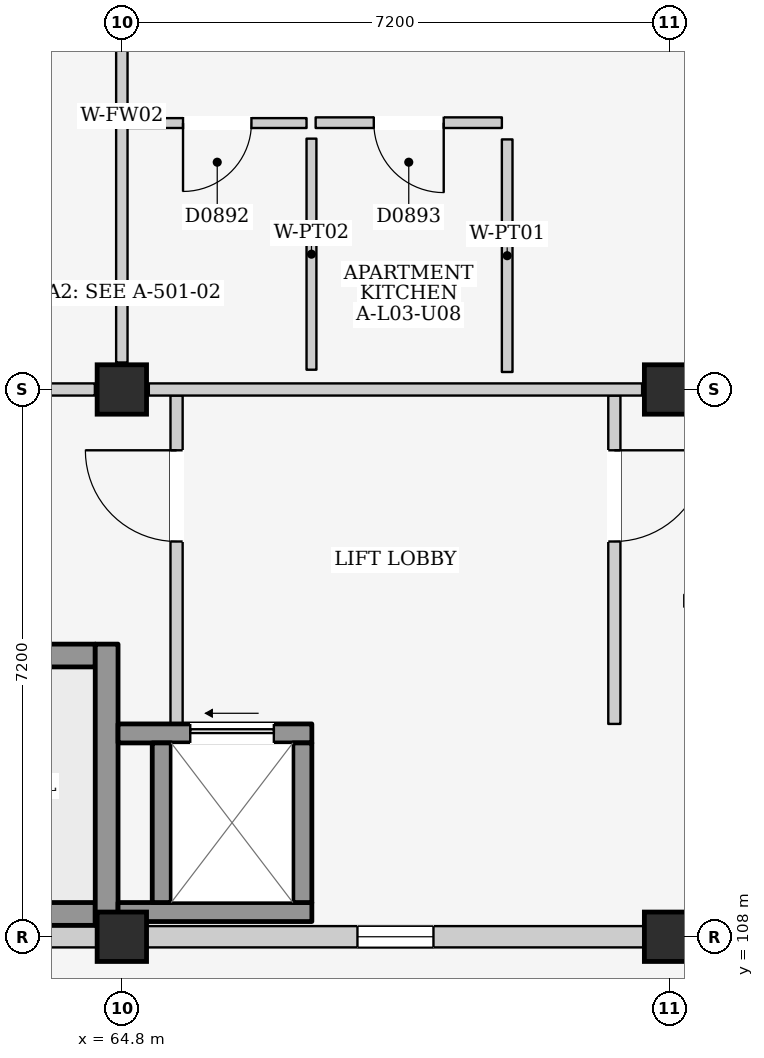
"""IFC4 building model, lengths in metres.
Left out: names, types, materials, properties, quantities, classifications, styles, units other than length and angle.
Written with IfcOpenShell. Run it as: python <this file> out.ifc"""

import sys

from ifc_helpers import new_model, si_unit, direction, frame, frame_2d, origin, origin_2d, place, context, subcontext, project, spatial, rectangle, extrude, element, fill, save


model = new_model("IFC4")
c1 = context("Model", 3, precision=1e-05, world=origin(), true_north=direction((0.0, 1.0)))
c2 = subcontext(c1, "Body", "Model", "MODEL_VIEW")
j1 = project(units=[si_unit("LENGTHUNIT", "METRE"), si_unit("PLANEANGLEUNIT", "RADIAN")], contexts=[c1])
p1 = place(None, origin())
s1 = spatial("IfcSite", under=j1, at=p1, CompositionType="ELEMENT")
p2 = place(p1, origin())
s2 = spatial("IfcBuilding", under=s1, at=p2, CompositionType="ELEMENT")
p3 = place(p2, frame((0.0, 0.0, 12.2)))
s3 = spatial("IfcBuildingStorey", under=s2, at=p3, CompositionType="ELEMENT", Elevation=12.2)
for number, where, z_axis, x_axis in (
    (1, (64.8, 108.0, 0.0), (0.0, 0.0, 1.0), (1.0, 0.0, 0.0)),
    (2, (64.8, 115.2, 0.0), (0.0, 0.0, 1.0), (1.0, 0.0, 0.0)),
    (3, (72.0, 108.0, 0.0), (0.0, 0.0, 1.0), (1.0, 0.0, 0.0)),
    (4, (72.0, 115.2, 0.0), (0.0, 0.0, 1.0), (1.0, 0.0, 0.0)),
):
    element("IfcColumn", number, at=place(p3, frame(where, z_axis=z_axis, x_axis=x_axis)), inside=s3, PredefinedType="COLUMN", context=c2, shape_type="SweptSolid", body=[
        extrude(rectangle(XDim=0.65, YDim=0.65, at=origin_2d()), origin(), (0.0, 0.0, 1.0), 3.2),
    ])
p4 = place(p3, frame((57.925, 108.0, 0.0), z_axis=(0.0, 0.0, 1.0), x_axis=(1.0, 0.0, 0.0)))
e5 = element("IfcWall", 5, at=p4, inside=s3, PredefinedType="ELEMENTEDWALL", context=c2, shape_type="SweptSolid", body=[
    extrude(rectangle(XDim=6.55, YDim=0.28, at=frame_2d((3.275, 0.0))), origin(), (0.0, 0.0, 1.0), 2.315),
])
p5 = place(p4, frame((2.775, 0.0, 1.2)))
e6 = element("IfcOpeningElement", 6, at=p5, cuts=e5, PredefinedType="OPENING", context=c2, shape_type="SweptSolid", body=[
    extrude(rectangle(XDim=1.0, YDim=0.9, at=frame_2d((0.5, 0.45))), frame((0.0, 0.155, 0.0), z_axis=(0.0, -1.0, 0.0), x_axis=(1.0, 0.0, 0.0)), (0.0, 0.0, 1.0), 0.31),
])
p6 = place(p3, frame((65.125, 108.0, 0.0), z_axis=(0.0, 0.0, 1.0), x_axis=(1.0, 0.0, 0.0)))
e7 = element("IfcWall", 7, at=p6, inside=s3, PredefinedType="ELEMENTEDWALL", context=c2, shape_type="SweptSolid", body=[
    extrude(rectangle(XDim=6.55, YDim=0.28, at=frame_2d((3.275, 0.0))), origin(), (0.0, 0.0, 1.0), 2.315),
])
p7 = place(p6, frame((2.775, 0.0, 1.2)))
e8 = element("IfcOpeningElement", 8, at=p7, cuts=e7, PredefinedType="OPENING", context=c2, shape_type="SweptSolid", body=[
    extrude(rectangle(XDim=1.0, YDim=0.9, at=frame_2d((0.5, 0.45))), frame((0.0, 0.155, 0.0), z_axis=(0.0, -1.0, 0.0), x_axis=(1.0, 0.0, 0.0)), (0.0, 0.0, 1.0), 0.31),
])
p8 = place(p3, frame((57.95, 108.3, 0.0), z_axis=(0.0, 0.0, 1.0), x_axis=(1.0, 0.0, 0.0)))
e9 = element("IfcWall", 9, at=p8, inside=s3, PredefinedType="SHEAR", context=c2, shape_type="SweptSolid", body=[
    extrude(rectangle(XDim=6.5, YDim=0.3, at=frame_2d((3.25, 0.0))), origin(), (0.0, 0.0, 1.0), 2.98),
])
p9 = place(p3, frame((57.95, 111.7, 0.0), z_axis=(0.0, 0.0, 1.0), x_axis=(1.0, 0.0, 0.0)))
e10 = element("IfcWall", 10, at=p9, inside=s3, PredefinedType="SHEAR", context=c2, shape_type="SweptSolid", body=[
    extrude(rectangle(XDim=6.5, YDim=0.3, at=frame_2d((3.25, 0.0))), origin(), (0.0, 0.0, 1.0), 2.98),
])
p10 = place(p9, frame((0.18, 0.0, 0.0)))
e11 = element("IfcOpeningElement", 11, at=p10, cuts=e10, PredefinedType="OPENING", context=c2, shape_type="SweptSolid", body=[
    extrude(rectangle(XDim=1.15, YDim=2.2, at=frame_2d((0.575, 1.1))), frame((0.0, 0.165, 0.0), z_axis=(0.0, -1.0, 0.0), x_axis=(1.0, 0.0, 0.0)), (0.0, 0.0, 1.0), 0.33),
])
p11 = place(p3, frame((64.6, 108.15, 0.0), z_axis=(0.0, 0.0, 1.0), x_axis=(0.0, 1.0, 0.0)))
e12 = element("IfcWall", 12, at=p11, inside=s3, PredefinedType="SHEAR", context=c2, shape_type="SweptSolid", body=[
    extrude(rectangle(XDim=3.7, YDim=0.3, at=frame_2d((1.85, 0.0))), origin(), (0.0, 0.0, 1.0), 2.98),
])
p12 = place(p3, frame((65.52, 110.8, 0.0), z_axis=(0.0, 0.0, 1.0), x_axis=(0.0, 1.0, 0.0)))
e13 = element("IfcWall", 13, at=p12, inside=s3, PredefinedType="PARTITIONING", context=c2, shape_type="SweptSolid", body=[
    extrude(rectangle(XDim=4.32, YDim=0.16, at=frame_2d((2.16, 0.0))), origin(), (0.0, 0.0, 1.0), 2.98),
])
p13 = place(p12, frame((2.4, 0.0, 0.0)))
e14 = element("IfcOpeningElement", 14, at=p13, cuts=e13, PredefinedType="OPENING", context=c2, shape_type="SweptSolid", body=[
    extrude(rectangle(XDim=1.2, YDim=2.2, at=frame_2d((0.6, 1.1))), frame((0.0, 0.095, 0.0), z_axis=(0.0, -1.0, 0.0), x_axis=(1.0, 0.0, 0.0)), (0.0, 0.0, 1.0), 0.19),
])
p14 = place(p3, frame((71.28, 110.8, 0.0), z_axis=(0.0, 0.0, 1.0), x_axis=(0.0, 1.0, 0.0)))
e15 = element("IfcWall", 15, at=p14, inside=s3, PredefinedType="PARTITIONING", context=c2, shape_type="SweptSolid", body=[
    extrude(rectangle(XDim=4.32, YDim=0.16, at=frame_2d((2.16, 0.0))), origin(), (0.0, 0.0, 1.0), 2.98),
])
p15 = place(p14, frame((2.4, 0.0, 0.0)))
e16 = element("IfcOpeningElement", 16, at=p15, cuts=e15, PredefinedType="OPENING", context=c2, shape_type="SweptSolid", body=[
    extrude(rectangle(XDim=1.2, YDim=2.2, at=frame_2d((0.6, 1.1))), frame((0.0, 0.095, 0.0), z_axis=(0.0, -1.0, 0.0), x_axis=(1.0, 0.0, 0.0)), (0.0, 0.0, 1.0), 0.19),
])
p16 = place(p3, frame((64.75, 108.325, 0.0), z_axis=(0.0, 0.0, 1.0), x_axis=(1.0, 0.0, 0.0)))
e17 = element("IfcWall", 17, at=p16, inside=s3, PredefinedType="SHEAR", context=c2, shape_type="SweptSolid", body=[
    extrude(rectangle(XDim=2.55, YDim=0.25, at=frame_2d((1.275, 0.0))), origin(), (0.0, 0.0, 1.0), 2.98),
])
p17 = place(p3, frame((64.75, 110.675, 0.0), z_axis=(0.0, 0.0, 1.0), x_axis=(1.0, 0.0, 0.0)))
e18 = element("IfcWall", 18, at=p17, inside=s3, PredefinedType="SHEAR", context=c2, shape_type="SweptSolid", body=[
    extrude(rectangle(XDim=2.55, YDim=0.25, at=frame_2d((1.275, 0.0))), origin(), (0.0, 0.0, 1.0), 2.98),
])
p18 = place(p17, frame((0.95, 0.0, 0.0)))
e19 = element("IfcOpeningElement", 19, at=p18, cuts=e18, PredefinedType="OPENING", context=c2, shape_type="SweptSolid", body=[
    extrude(rectangle(XDim=1.1, YDim=2.15, at=frame_2d((0.55, 1.075))), frame((0.0, 0.14, 0.0), z_axis=(0.0, -1.0, 0.0), x_axis=(1.0, 0.0, 0.0)), (0.0, 0.0, 1.0), 0.28),
])
for number, where, z_axis, x_axis in (
    (20, (65.325, 108.45, 0.0), (0.0, 0.0, 1.0), (0.0, 1.0, 0.0)),
    (21, (67.175, 108.45, 0.0), (0.0, 0.0, 1.0), (0.0, 1.0, 0.0)),
):
    element("IfcWall", number, at=place(p3, frame(where, z_axis=z_axis, x_axis=x_axis)), inside=s3, PredefinedType="SHEAR", context=c2, shape_type="SweptSolid", body=[
        extrude(rectangle(XDim=2.1, YDim=0.25, at=frame_2d((1.05, 0.0))), origin(), (0.0, 0.0, 1.0), 2.98),
    ])
p19 = place(p3, frame((57.955, 115.2, 0.0), z_axis=(0.0, 0.0, 1.0), x_axis=(1.0, 0.0, 0.0)))
e22 = element("IfcWall", 22, at=p19, inside=s3, PredefinedType="PARTITIONING", context=c2, shape_type="SweptSolid", body=[
    extrude(rectangle(XDim=6.49, YDim=0.16, at=frame_2d((3.245, 0.0))), origin(), (0.0, 0.0, 1.0), 2.315),
])
p20 = place(p19, frame((2.745, 0.0, 0.0)))
e23 = element("IfcOpeningElement", 23, at=p20, cuts=e22, PredefinedType="OPENING", context=c2, shape_type="SweptSolid", body=[
    extrude(rectangle(XDim=1.0, YDim=2.15, at=frame_2d((0.5, 1.075))), frame((0.0, 0.095, 0.0), z_axis=(0.0, -1.0, 0.0), x_axis=(1.0, 0.0, 0.0)), (0.0, 0.0, 1.0), 0.19),
])
p21 = place(p3, frame((64.8, 115.555, 0.0), z_axis=(0.0, 0.0, 1.0), x_axis=(0.0, 1.0, 0.0)))
e24 = element("IfcWall", 24, at=p21, inside=s3, PredefinedType="PARTITIONING", context=c2, shape_type="SweptSolid", body=[
    extrude(rectangle(XDim=6.49, YDim=0.15, at=frame_2d((3.245, 0.0))), origin(), (0.0, 0.0, 1.0), 2.415),
])
p22 = place(p3, frame((65.155, 115.2, 0.0), z_axis=(0.0, 0.0, 1.0), x_axis=(1.0, 0.0, 0.0)))
e25 = element("IfcWall", 25, at=p22, inside=s3, PredefinedType="PARTITIONING", context=c2, shape_type="SweptSolid", body=[
    extrude(rectangle(XDim=6.49, YDim=0.16, at=frame_2d((3.245, 0.0))), origin(), (0.0, 0.0, 1.0), 2.315),
])
p23 = place(p3, frame((64.88, 118.705, 0.0), z_axis=(0.0, 0.0, 1.0), x_axis=(1.0, 0.0, 0.0)))
e26 = element("IfcWall", 26, at=p23, inside=s3, PredefinedType="PARTITIONING", context=c2, shape_type="SweptSolid", body=[
    extrude(rectangle(XDim=2.35, YDim=0.13, at=frame_2d((1.175, 0.0))), origin(), (0.0, 0.0, 1.0), 2.98),
])
p24 = place(p23, frame((0.725, 0.0, 0.0)))
e27 = element("IfcOpeningElement", 27, at=p24, cuts=e26, PredefinedType="OPENING", context=c2, shape_type="SweptSolid", body=[
    extrude(rectangle(XDim=0.9, YDim=2.1, at=frame_2d((0.45, 1.05))), frame((0.0, 0.08, 0.0), z_axis=(0.0, -1.0, 0.0), x_axis=(1.0, 0.0, 0.0)), (0.0, 0.0, 1.0), 0.16),
])
p25 = place(p3, frame((67.295, 115.46, 0.0), z_axis=(0.0, 0.0, 1.0), x_axis=(0.0, 1.0, 0.0)))
e28 = element("IfcWall", 28, at=p25, inside=s3, PredefinedType="PARTITIONING", context=c2, shape_type="SweptSolid", body=[
    extrude(rectangle(XDim=3.04, YDim=0.13, at=frame_2d((1.52, 0.0))), origin(), (0.0, 0.0, 1.0), 2.98),
])
p26 = place(p3, frame((67.35, 118.71, 0.0), z_axis=(0.0, 0.0, 1.0), x_axis=(1.0, 0.0, 0.0)))
e29 = element("IfcWall", 29, at=p26, inside=s3, PredefinedType="PARTITIONING", context=c2, shape_type="SweptSolid", body=[
    extrude(rectangle(XDim=2.45, YDim=0.14, at=frame_2d((1.225, 0.0))), origin(), (0.0, 0.0, 1.0), 2.98),
])
p27 = place(p26, frame((0.765, 0.0, 0.0)))
e30 = element("IfcOpeningElement", 30, at=p27, cuts=e29, PredefinedType="OPENING", context=c2, shape_type="SweptSolid", body=[
    extrude(rectangle(XDim=0.92, YDim=2.1, at=frame_2d((0.46, 1.05))), frame((0.0, 0.085, 0.0), z_axis=(0.0, -1.0, 0.0), x_axis=(1.0, 0.0, 0.0)), (0.0, 0.0, 1.0), 0.17),
])
p28 = place(p3, frame((69.87, 115.43, 0.0), z_axis=(0.0, 0.0, 1.0), x_axis=(0.0, 1.0, 0.0)))
e31 = element("IfcWall", 31, at=p28, inside=s3, PredefinedType="PARTITIONING", context=c2, shape_type="SweptSolid", body=[
    extrude(rectangle(XDim=3.06, YDim=0.14, at=frame_2d((1.53, 0.0))), origin(), (0.0, 0.0, 1.0), 2.98),
])
p29 = place(p3, frame((72.2, 112.42, 0.0), z_axis=(0.0, 0.0, 1.0), x_axis=(1.0, 0.0, 0.0)))
e32 = element("IfcWall", 32, at=p29, inside=s3, PredefinedType="PARTITIONING", context=c2, shape_type="SweptSolid", body=[
    extrude(rectangle(XDim=6.8, YDim=0.16, at=frame_2d((3.4, 0.0))), origin(), (0.0, 0.0, 1.0), 2.98),
])
p30 = place(p29, frame((2.93, 0.0, 0.0)))
e33 = element("IfcOpeningElement", 33, at=p30, cuts=e32, PredefinedType="OPENING", context=c2, shape_type="SweptSolid", body=[
    extrude(rectangle(XDim=0.94, YDim=2.12, at=frame_2d((0.47, 1.06))), frame((0.0, 0.095, 0.0), z_axis=(0.0, -1.0, 0.0), x_axis=(1.0, 0.0, 0.0)), (0.0, 0.0, 1.0), 0.19),
])
p31 = place(p7, origin())
e34 = element("IfcWindow", 34, at=p31, inside=s3, PartitioningType="SINGLE_PANEL", PredefinedType="WINDOW", context=c2, shape_type="SweptSolid", body=[
    extrude(rectangle(XDim=1.0, YDim=0.9, at=frame_2d((0.5, 0.45))), frame((0.0, 0.03, 0.0), z_axis=(0.0, -1.0, 0.0), x_axis=(1.0, 0.0, 0.0)), (0.0, 0.0, 1.0), 0.06),
])
fill(e8, e34)
p32 = place(p13, origin())
e35 = element("IfcDoor", 35, at=p32, inside=s3, OperationType="SINGLE_SWING_RIGHT", PredefinedType="DOOR", context=c2, shape_type="SweptSolid", body=[
    extrude(rectangle(XDim=1.2, YDim=2.2, at=frame_2d((0.6, 1.1))), frame((0.0, 0.025, 0.0), z_axis=(0.0, -1.0, 0.0), x_axis=(1.0, 0.0, 0.0)), (0.0, 0.0, 1.0), 0.05),
])
fill(e14, e35)
p33 = place(p15, frame((1.2, 0.0, 0.0), z_axis=(0.0, 0.0, 1.0), x_axis=(-1.0, 0.0, 0.0)))
e36 = element("IfcDoor", 36, at=p33, inside=s3, OperationType="SINGLE_SWING_LEFT", PredefinedType="DOOR", context=c2, shape_type="SweptSolid", body=[
    extrude(rectangle(XDim=1.2, YDim=2.2, at=frame_2d((0.6, 1.1))), frame((0.0, 0.025, 0.0), z_axis=(0.0, -1.0, 0.0), x_axis=(1.0, 0.0, 0.0)), (0.0, 0.0, 1.0), 0.05),
])
fill(e16, e36)
p34 = place(p18, origin())
e37 = element("IfcDoor", 37, at=p34, inside=s3, OperationType="SLIDING_TO_LEFT", PredefinedType="DOOR", context=c2, shape_type="SweptSolid", body=[
    extrude(rectangle(XDim=1.1, YDim=2.15, at=frame_2d((0.55, 1.075))), frame((0.0, 0.025, 0.0), z_axis=(0.0, -1.0, 0.0), x_axis=(1.0, 0.0, 0.0)), (0.0, 0.0, 1.0), 0.05),
])
fill(e19, e37)
p35 = place(p24, frame((0.9, 0.0, 0.0), z_axis=(0.0, 0.0, 1.0), x_axis=(-1.0, 0.0, 0.0)))
e38 = element("IfcDoor", 38, at=p35, inside=s3, OperationType="SINGLE_SWING_RIGHT", PredefinedType="DOOR", context=c2, shape_type="SweptSolid", body=[
    extrude(rectangle(XDim=0.9, YDim=2.1, at=frame_2d((0.45, 1.05))), frame((0.0, 0.025, 0.0), z_axis=(0.0, -1.0, 0.0), x_axis=(1.0, 0.0, 0.0)), (0.0, 0.0, 1.0), 0.05),
])
fill(e27, e38)
p36 = place(p27, frame((0.92, 0.0, 0.0), z_axis=(0.0, 0.0, 1.0), x_axis=(-1.0, 0.0, 0.0)))
e39 = element("IfcDoor", 39, at=p36, inside=s3, OperationType="SINGLE_SWING_LEFT", PredefinedType="DOOR", context=c2, shape_type="SweptSolid", body=[
    extrude(rectangle(XDim=0.92, YDim=2.1, at=frame_2d((0.46, 1.05))), frame((0.0, 0.025, 0.0), z_axis=(0.0, -1.0, 0.0), x_axis=(1.0, 0.0, 0.0)), (0.0, 0.0, 1.0), 0.05),
])
fill(e30, e39)
save(model, sys.argv[1])
